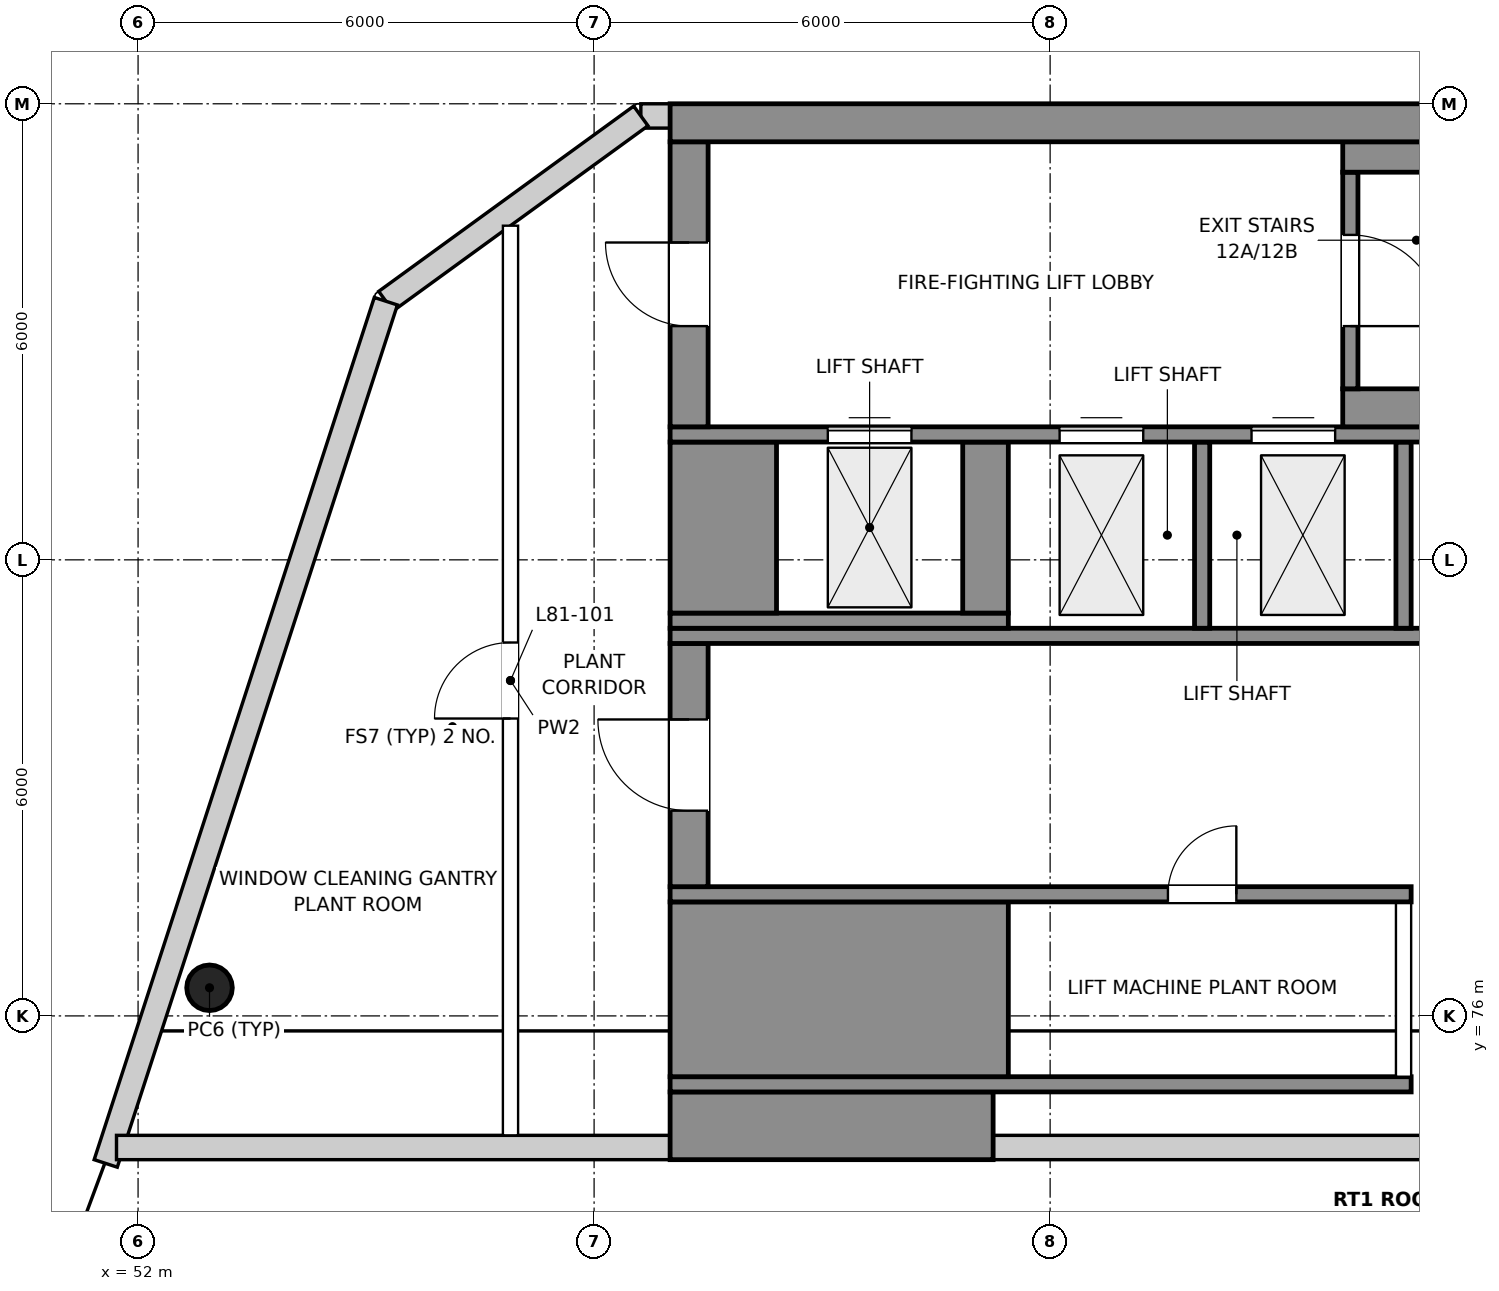
"""IFC4 building model, lengths in metres.
Left out: names, types, materials, properties, quantities, classifications, styles, units other than length and angle.
Written with IfcOpenShell. Run it as: python <this file> out.ifc"""

import sys

from ifc_helpers import new_model, si_unit, direction, frame, frame_2d, origin, origin_2d, place, context, subcontext, project, spatial, polyline, rectangle, circle, outline, extrude, element, fill, save


model = new_model("IFC4")
c1 = context("Model", 3, precision=1e-05, world=origin(), true_north=direction((0.0, 1.0)))
c2 = subcontext(c1, "Body", "Model", "MODEL_VIEW")
j1 = project(units=[si_unit("LENGTHUNIT", "METRE"), si_unit("PLANEANGLEUNIT", "RADIAN")], contexts=[c1])
p1 = place(None, origin())
s1 = spatial("IfcSite", under=j1, at=p1, CompositionType="ELEMENT")
p2 = place(p1, origin())
s2 = spatial("IfcBuilding", under=s1, at=p2, CompositionType="ELEMENT")
p3 = place(p2, frame((0.0, 0.0, 346.7)))
s3 = spatial("IfcBuildingStorey", under=s2, at=p3, CompositionType="ELEMENT", Elevation=346.7)
p4 = place(p3, frame((52.94, 76.37, 0.0), z_axis=(0.0, 0.0, 1.0), x_axis=(1.0, 0.0, 0.0)))
e1 = element("IfcColumn", 1, at=p4, inside=s3, PredefinedType="COLUMN", context=c2, shape_type="SweptSolid", body=[
    extrude(circle(Radius=0.3, at=origin_2d()), origin(), (0.0, 0.0, 1.0), 4.5),
])
p5 = place(p3, frame((59.0, 87.84, 0.0), z_axis=(0.0, 0.0, 1.0), x_axis=(-1.0, 0.0, 0.0)))
e2 = element("IfcWall", 2, at=p5, inside=s3, PredefinedType="SOLIDWALL", context=c2, shape_type="SweptSolid", body=[
    extrude(rectangle(XDim=0.385, YDim=0.32, at=frame_2d((0.192, 0.0))), origin(), (0.0, 0.0, 1.0), 4.2),
])
p6 = place(p3, frame((58.615, 87.84, 0.0), z_axis=(0.0, 0.0, 1.0), x_axis=(-0.80900078054, -0.587807568074, 0.0)))
e3 = element("IfcWall", 3, at=p6, inside=s3, PredefinedType="SOLIDWALL", context=c2, shape_type="SweptSolid", body=[
    extrude(rectangle(XDim=4.147, YDim=0.32, at=frame_2d((2.073, 0.0))), origin(), (0.0, 0.0, 1.0), 4.2),
])
p7 = place(p3, frame((55.26, 85.403, 0.0), z_axis=(0.0, 0.0, 1.0), x_axis=(-0.309021736923, -0.951054975335, 0.0)))
e4 = element("IfcWall", 4, at=p7, inside=s3, PredefinedType="SOLIDWALL", context=c2, shape_type="SweptSolid", body=[
    extrude(outline(polyline([(0.0, 0.0), (11.927, 0.0), (11.927, 2.656), (10.094, 4.2), (0.0, 4.2), (0.0, 0.0)])), frame((0.0, 0.16, 0.0), z_axis=(0.0, -1.0, 0.0), x_axis=(1.0, 0.0, 0.0)), (0.0, 0.0, 1.0), 0.32),
])
p8 = place(p3, frame((51.716, 74.269, 0.0), z_axis=(0.0, 0.0, 1.0), x_axis=(1.0, 0.0, 0.0)))
e5 = element("IfcWall", 5, at=p8, inside=s3, PredefinedType="SOLIDWALL", context=c2, shape_type="SweptSolid", body=[
    extrude(rectangle(XDim=7.284, YDim=0.32, at=frame_2d((3.642, 0.0))), origin(), (0.0, 0.0, 1.0), 2.842),
])
p9 = place(p3, frame((63.25, 74.269, 0.0), z_axis=(0.0, 0.0, 1.0), x_axis=(1.0, 0.0, 0.0)))
e6 = element("IfcWall", 6, at=p9, inside=s3, PredefinedType="SOLIDWALL", context=c2, shape_type="SweptSolid", body=[
    extrude(rectangle(XDim=13.5, YDim=0.32, at=frame_2d((6.75, 0.0))), origin(), (0.0, 0.0, 1.0), 2.842),
])
p10 = place(p3, frame((59.0, 74.554, 0.0), z_axis=(0.0, 0.0, 1.0), x_axis=(1.0, 0.0, 0.0)))
e7 = element("IfcWall", 7, at=p10, inside=s3, PredefinedType="SHEAR", context=c2, shape_type="SweptSolid", body=[
    extrude(rectangle(XDim=4.25, YDim=0.891, at=frame_2d((2.125, 0.0))), origin(), (0.0, 0.0, 1.0), 3.045),
])
p11 = place(p3, frame((59.0, 75.1, 0.0), z_axis=(0.0, 0.0, 1.0), x_axis=(1.0, 0.0, 0.0)))
e8 = element("IfcWall", 8, at=p11, inside=s3, PredefinedType="SHEAR", context=c2, shape_type="SweptSolid", body=[
    extrude(rectangle(XDim=9.75, YDim=0.2, at=frame_2d((4.875, 0.0))), origin(), (0.0, 0.0, 1.0), 3.528),
])
p12 = place(p3, frame((59.0, 76.35, 0.0), z_axis=(0.0, 0.0, 1.0), x_axis=(1.0, 0.0, 0.0)))
e9 = element("IfcWall", 9, at=p12, inside=s3, PredefinedType="SHEAR", context=c2, shape_type="SweptSolid", body=[
    extrude(rectangle(XDim=4.45, YDim=2.3, at=frame_2d((2.225, 0.0))), origin(), (0.0, 0.0, 1.0), 4.5),
])
p13 = place(p3, frame((68.65, 75.2, 0.0), z_axis=(0.0, 0.0, 1.0), x_axis=(0.0, 1.0, 0.0)))
e10 = element("IfcWall", 10, at=p13, inside=s3, PredefinedType="PARTITIONING", context=c2, shape_type="SweptSolid", body=[
    extrude(outline(polyline([(0.0, 0.0), (2.3, 0.0), (2.3, 4.2), (0.0, 3.516), (0.0, 0.0)])), frame((0.0, 0.1, 0.0), z_axis=(0.0, -1.0, 0.0), x_axis=(1.0, 0.0, 0.0)), (0.0, 0.0, 1.0), 0.2),
])
p14 = place(p3, frame((59.0, 77.6, 0.0), z_axis=(0.0, 0.0, 1.0), x_axis=(1.0, 0.0, 0.0)))
e11 = element("IfcWall", 11, at=p14, inside=s3, PredefinedType="SHEAR", context=c2, shape_type="SweptSolid", body=[
    extrude(rectangle(XDim=9.75, YDim=0.2, at=frame_2d((4.875, 0.0))), origin(), (0.0, 0.0, 1.0), 4.5),
])
p15 = place(p14, frame((6.55, 0.0, 0.0)))
e12 = element("IfcOpeningElement", 12, at=p15, cuts=e11, PredefinedType="OPENING", context=c2, shape_type="SweptSolid", body=[
    extrude(rectangle(XDim=0.9, YDim=2.1, at=frame_2d((0.45, 1.05))), frame((0.0, 0.11, 0.0), z_axis=(0.0, -1.0, 0.0), x_axis=(1.0, 0.0, 0.0)), (0.0, 0.0, 1.0), 0.22),
])
p16 = place(p3, frame((59.25, 77.7, 0.0), z_axis=(0.0, 0.0, 1.0), x_axis=(0.0, 1.0, 0.0)))
e13 = element("IfcWall", 13, at=p16, inside=s3, PredefinedType="SHEAR", context=c2, shape_type="SweptSolid", body=[
    extrude(rectangle(XDim=3.2, YDim=0.5, at=frame_2d((1.6, 0.0))), origin(), (0.0, 0.0, 1.0), 4.5),
])
p17 = place(p16, frame((1.0, 0.0, 0.0)))
e14 = element("IfcOpeningElement", 14, at=p17, cuts=e13, PredefinedType="OPENING", context=c2, shape_type="SweptSolid", body=[
    extrude(rectangle(XDim=1.2, YDim=2.1, at=frame_2d((0.6, 1.05))), frame((0.0, 0.26, 0.0), z_axis=(0.0, -1.0, 0.0), x_axis=(1.0, 0.0, 0.0)), (0.0, 0.0, 1.0), 0.52),
])
p18 = place(p3, frame((59.0, 81.0, 0.0), z_axis=(0.0, 0.0, 1.0), x_axis=(1.0, 0.0, 0.0)))
e15 = element("IfcWall", 15, at=p18, inside=s3, PredefinedType="SHEAR", context=c2, shape_type="SweptSolid", body=[
    extrude(rectangle(XDim=22.0, YDim=0.2, at=frame_2d((11.0, 0.0))), origin(), (0.0, 0.0, 1.0), 4.5),
])
p19 = place(p18, frame((11.85, 0.0, 0.0)))
e16 = element("IfcOpeningElement", 16, at=p19, cuts=e15, PredefinedType="OPENING", context=c2, shape_type="SweptSolid", body=[
    extrude(rectangle(XDim=0.9, YDim=2.1, at=frame_2d((0.45, 1.05))), frame((0.0, 0.11, 0.0), z_axis=(0.0, -1.0, 0.0), x_axis=(1.0, 0.0, 0.0)), (0.0, 0.0, 1.0), 0.22),
])
p20 = place(p18, frame((15.825, 0.0, 0.0)))
e17 = element("IfcOpeningElement", 17, at=p20, cuts=e15, PredefinedType="OPENING", context=c2, shape_type="SweptSolid", body=[
    extrude(rectangle(XDim=0.9, YDim=2.1, at=frame_2d((0.45, 1.05))), frame((0.0, 0.11, 0.0), z_axis=(0.0, -1.0, 0.0), x_axis=(1.0, 0.0, 0.0)), (0.0, 0.0, 1.0), 0.22),
])
p21 = place(p3, frame((59.0, 81.2, 0.0), z_axis=(0.0, 0.0, 1.0), x_axis=(1.0, 0.0, 0.0)))
e18 = element("IfcWall", 18, at=p21, inside=s3, PredefinedType="SHEAR", context=c2, shape_type="SweptSolid", body=[
    extrude(rectangle(XDim=4.45, YDim=0.2, at=frame_2d((2.225, 0.0))), origin(), (0.0, 0.0, 1.0), 4.5),
])
for number, where, z_axis, x_axis in (
    (19, (66.0, 81.1, 0.0), (0.0, 0.0, 1.0), (0.0, 1.0, 0.0)),
    (20, (68.65, 81.1, 0.0), (0.0, 0.0, 1.0), (0.0, 1.0, 0.0)),
):
    element("IfcWall", number, at=place(p3, frame(where, z_axis=z_axis, x_axis=x_axis)), inside=s3, PredefinedType="SHEAR", context=c2, shape_type="SweptSolid", body=[
        extrude(rectangle(XDim=2.45, YDim=0.2, at=frame_2d((1.225, 0.0))), origin(), (0.0, 0.0, 1.0), 4.5),
    ])
p22 = place(p3, frame((59.7, 81.3, 0.0), z_axis=(0.0, 0.0, 1.0), x_axis=(0.0, 1.0, 0.0)))
e21 = element("IfcWall", 21, at=p22, inside=s3, PredefinedType="SHEAR", context=c2, shape_type="SweptSolid", body=[
    extrude(rectangle(XDim=2.25, YDim=1.4, at=frame_2d((1.125, 0.0))), origin(), (0.0, 0.0, 1.0), 4.5),
])
p23 = place(p3, frame((63.15, 81.3, 0.0), z_axis=(0.0, 0.0, 1.0), x_axis=(0.0, 1.0, 0.0)))
e22 = element("IfcWall", 22, at=p23, inside=s3, PredefinedType="SHEAR", context=c2, shape_type="SweptSolid", body=[
    extrude(rectangle(XDim=2.25, YDim=0.6, at=frame_2d((1.125, 0.0))), origin(), (0.0, 0.0, 1.0), 4.5),
])
p24 = place(p3, frame((59.0, 83.65, 0.0), z_axis=(0.0, 0.0, 1.0), x_axis=(1.0, 0.0, 0.0)))
e23 = element("IfcWall", 23, at=p24, inside=s3, PredefinedType="SHEAR", context=c2, shape_type="SweptSolid", body=[
    extrude(rectangle(XDim=22.0, YDim=0.2, at=frame_2d((11.0, 0.0))), origin(), (0.0, 0.0, 1.0), 4.5),
])
p25 = place(p24, frame((5.125, 0.0, 0.0)))
e24 = element("IfcOpeningElement", 24, at=p25, cuts=e23, PredefinedType="OPENING", context=c2, shape_type="SweptSolid", body=[
    extrude(rectangle(XDim=1.1, YDim=2.1, at=frame_2d((0.55, 1.05))), frame((0.0, 0.11, 0.0), z_axis=(0.0, -1.0, 0.0), x_axis=(1.0, 0.0, 0.0)), (0.0, 0.0, 1.0), 0.22),
])
p26 = place(p24, frame((7.65, 0.0, 0.0)))
e25 = element("IfcOpeningElement", 25, at=p26, cuts=e23, PredefinedType="OPENING", context=c2, shape_type="SweptSolid", body=[
    extrude(rectangle(XDim=1.1, YDim=2.1, at=frame_2d((0.55, 1.05))), frame((0.0, 0.11, 0.0), z_axis=(0.0, -1.0, 0.0), x_axis=(1.0, 0.0, 0.0)), (0.0, 0.0, 1.0), 0.22),
])
p27 = place(p24, frame((18.775, 0.0, 0.0)))
e26 = element("IfcOpeningElement", 26, at=p27, cuts=e23, PredefinedType="OPENING", context=c2, shape_type="SweptSolid", body=[
    extrude(rectangle(XDim=1.2, YDim=2.1, at=frame_2d((0.6, 1.05))), frame((0.0, 0.11, 0.0), z_axis=(0.0, -1.0, 0.0), x_axis=(1.0, 0.0, 0.0)), (0.0, 0.0, 1.0), 0.22),
])
p28 = place(p24, frame((2.075, 0.0, 0.0)))
e27 = element("IfcOpeningElement", 27, at=p28, cuts=e23, PredefinedType="OPENING", context=c2, shape_type="SweptSolid", body=[
    extrude(rectangle(XDim=1.1, YDim=2.1, at=frame_2d((0.55, 1.05))), frame((0.0, 0.11, 0.0), z_axis=(0.0, -1.0, 0.0), x_axis=(1.0, 0.0, 0.0)), (0.0, 0.0, 1.0), 0.22),
])
p29 = place(p3, frame((59.25, 83.75, 0.0), z_axis=(0.0, 0.0, 1.0), x_axis=(0.0, 1.0, 0.0)))
e28 = element("IfcWall", 28, at=p29, inside=s3, PredefinedType="SHEAR", context=c2, shape_type="SweptSolid", body=[
    extrude(rectangle(XDim=3.75, YDim=0.5, at=frame_2d((1.875, 0.0))), origin(), (0.0, 0.0, 1.0), 4.5),
])
p30 = place(p29, frame((1.325, 0.0, 0.0)))
e29 = element("IfcOpeningElement", 29, at=p30, cuts=e28, PredefinedType="OPENING", context=c2, shape_type="SweptSolid", body=[
    extrude(rectangle(XDim=1.1, YDim=2.1, at=frame_2d((0.55, 1.05))), frame((0.0, 0.26, 0.0), z_axis=(0.0, -1.0, 0.0), x_axis=(1.0, 0.0, 0.0)), (0.0, 0.0, 1.0), 0.52),
])
p31 = place(p3, frame((67.85, 84.0, 0.0), z_axis=(0.0, 0.0, 1.0), x_axis=(1.0, 0.0, 0.0)))
e30 = element("IfcWall", 30, at=p31, inside=s3, PredefinedType="SHEAR", context=c2, shape_type="SweptSolid", body=[
    extrude(rectangle(XDim=9.1, YDim=0.5, at=frame_2d((4.55, 0.0))), origin(), (0.0, 0.0, 1.0), 4.5),
])
p32 = place(p3, frame((67.95, 84.25, 0.0), z_axis=(0.0, 0.0, 1.0), x_axis=(0.0, 1.0, 0.0)))
e31 = element("IfcWall", 31, at=p32, inside=s3, PredefinedType="SHEAR", context=c2, shape_type="SweptSolid", body=[
    extrude(rectangle(XDim=2.85, YDim=0.2, at=frame_2d((1.425, 0.0))), origin(), (0.0, 0.0, 1.0), 4.5),
])
p33 = place(p32, frame((0.825, 0.0, 0.0)))
e32 = element("IfcOpeningElement", 32, at=p33, cuts=e31, PredefinedType="OPENING", context=c2, shape_type="SweptSolid", body=[
    extrude(rectangle(XDim=1.2, YDim=2.1, at=frame_2d((0.6, 1.05))), frame((0.0, 0.11, 0.0), z_axis=(0.0, -1.0, 0.0), x_axis=(1.0, 0.0, 0.0)), (0.0, 0.0, 1.0), 0.22),
])
p34 = place(p3, frame((67.85, 87.3, 0.0), z_axis=(0.0, 0.0, 1.0), x_axis=(1.0, 0.0, 0.0)))
e33 = element("IfcWall", 33, at=p34, inside=s3, PredefinedType="SHEAR", context=c2, shape_type="SweptSolid", body=[
    extrude(rectangle(XDim=9.1, YDim=0.4, at=frame_2d((4.55, 0.0))), origin(), (0.0, 0.0, 1.0), 4.5),
])
p35 = place(p3, frame((59.0, 87.75, 0.0), z_axis=(0.0, 0.0, 1.0), x_axis=(1.0, 0.0, 0.0)))
e34 = element("IfcWall", 34, at=p35, inside=s3, PredefinedType="SHEAR", context=c2, shape_type="SweptSolid", body=[
    extrude(rectangle(XDim=22.0, YDim=0.5, at=frame_2d((11.0, 0.0))), origin(), (0.0, 0.0, 1.0), 4.5),
])
p36 = place(p3, frame((56.9, 74.429, 0.0), z_axis=(0.0, 0.0, 1.0), x_axis=(0.0, 1.0, 0.0)))
e35 = element("IfcWall", 35, at=p36, inside=s3, PredefinedType="PARTITIONING", context=c2, shape_type="SweptSolid", body=[
    extrude(outline(polyline([(0.0, 0.0), (11.968, 0.0), (11.968, 3.75), (0.0, 2.833), (0.0, 0.0)])), frame((0.0, 0.1, 0.0), z_axis=(0.0, -1.0, 0.0), x_axis=(1.0, 0.0, 0.0)), (0.0, 0.0, 1.0), 0.2),
])
p37 = place(p36, frame((5.484, 0.0, 0.0)))
e36 = element("IfcOpeningElement", 36, at=p37, cuts=e35, PredefinedType="OPENING", context=c2, shape_type="SweptSolid", body=[
    extrude(rectangle(XDim=1.0, YDim=2.1, at=frame_2d((0.5, 1.05))), frame((0.0, 0.11, 0.0), z_axis=(0.0, -1.0, 0.0), x_axis=(1.0, 0.0, 0.0)), (0.0, 0.0, 1.0), 0.22),
])
p38 = place(p33, frame((1.2, 0.0, 0.0), z_axis=(0.0, 0.0, 1.0), x_axis=(-1.0, 0.0, 0.0)))
e37 = element("IfcDoor", 37, at=p38, inside=s3, OperationType="SINGLE_SWING_RIGHT", PredefinedType="DOOR", context=c2, shape_type="SweptSolid", body=[
    extrude(rectangle(XDim=1.2, YDim=2.1, at=frame_2d((0.6, 1.05))), frame((0.0, 0.025, 0.0), z_axis=(0.0, -1.0, 0.0), x_axis=(1.0, 0.0, 0.0)), (0.0, 0.0, 1.0), 0.05),
])
fill(e32, e37)
p39 = place(p17, origin())
e38 = element("IfcDoor", 38, at=p39, inside=s3, OperationType="SINGLE_SWING_RIGHT", PredefinedType="DOOR", context=c2, shape_type="SweptSolid", body=[
    extrude(rectangle(XDim=1.2, YDim=2.1, at=frame_2d((0.6, 1.05))), frame((0.0, 0.025, 0.0), z_axis=(0.0, -1.0, 0.0), x_axis=(1.0, 0.0, 0.0)), (0.0, 0.0, 1.0), 0.05),
])
fill(e14, e38)
p40 = place(p30, origin())
e39 = element("IfcDoor", 39, at=p40, inside=s3, OperationType="SINGLE_SWING_RIGHT", PredefinedType="DOOR", context=c2, shape_type="SweptSolid", body=[
    extrude(rectangle(XDim=1.1, YDim=2.1, at=frame_2d((0.55, 1.05))), frame((0.0, 0.025, 0.0), z_axis=(0.0, -1.0, 0.0), x_axis=(1.0, 0.0, 0.0)), (0.0, 0.0, 1.0), 0.05),
])
fill(e29, e39)
p41 = place(p25, origin())
e40 = element("IfcDoor", 40, at=p41, inside=s3, OperationType="DOUBLE_DOOR_SLIDING", PredefinedType="DOOR", context=c2, shape_type="SweptSolid", body=[
    extrude(rectangle(XDim=1.1, YDim=2.1, at=frame_2d((0.55, 1.05))), frame((0.0, 0.025, 0.0), z_axis=(0.0, -1.0, 0.0), x_axis=(1.0, 0.0, 0.0)), (0.0, 0.0, 1.0), 0.05),
])
fill(e24, e40)
p42 = place(p26, origin())
e41 = element("IfcDoor", 41, at=p42, inside=s3, OperationType="DOUBLE_DOOR_SLIDING", PredefinedType="DOOR", context=c2, shape_type="SweptSolid", body=[
    extrude(rectangle(XDim=1.1, YDim=2.1, at=frame_2d((0.55, 1.05))), frame((0.0, 0.025, 0.0), z_axis=(0.0, -1.0, 0.0), x_axis=(1.0, 0.0, 0.0)), (0.0, 0.0, 1.0), 0.05),
])
fill(e25, e41)
p43 = place(p28, origin())
e42 = element("IfcDoor", 42, at=p43, inside=s3, OperationType="DOUBLE_DOOR_SLIDING", PredefinedType="DOOR", context=c2, shape_type="SweptSolid", body=[
    extrude(rectangle(XDim=1.1, YDim=2.1, at=frame_2d((0.55, 1.05))), frame((0.0, 0.025, 0.0), z_axis=(0.0, -1.0, 0.0), x_axis=(1.0, 0.0, 0.0)), (0.0, 0.0, 1.0), 0.05),
])
fill(e27, e42)
p44 = place(p15, origin())
e43 = element("IfcDoor", 43, at=p44, inside=s3, OperationType="SINGLE_SWING_RIGHT", PredefinedType="DOOR", context=c2, shape_type="SweptSolid", body=[
    extrude(rectangle(XDim=0.9, YDim=2.1, at=frame_2d((0.45, 1.05))), frame((0.0, 0.025, 0.0), z_axis=(0.0, -1.0, 0.0), x_axis=(1.0, 0.0, 0.0)), (0.0, 0.0, 1.0), 0.05),
])
fill(e12, e43)
p45 = place(p37, origin())
e44 = element("IfcDoor", 44, at=p45, inside=s3, OperationType="SINGLE_SWING_LEFT", PredefinedType="DOOR", context=c2, shape_type="SweptSolid", body=[
    extrude(rectangle(XDim=1.0, YDim=2.1, at=frame_2d((0.5, 1.05))), frame((0.0, 0.025, 0.0), z_axis=(0.0, -1.0, 0.0), x_axis=(1.0, 0.0, 0.0)), (0.0, 0.0, 1.0), 0.05),
])
fill(e36, e44)
save(model, sys.argv[1])
